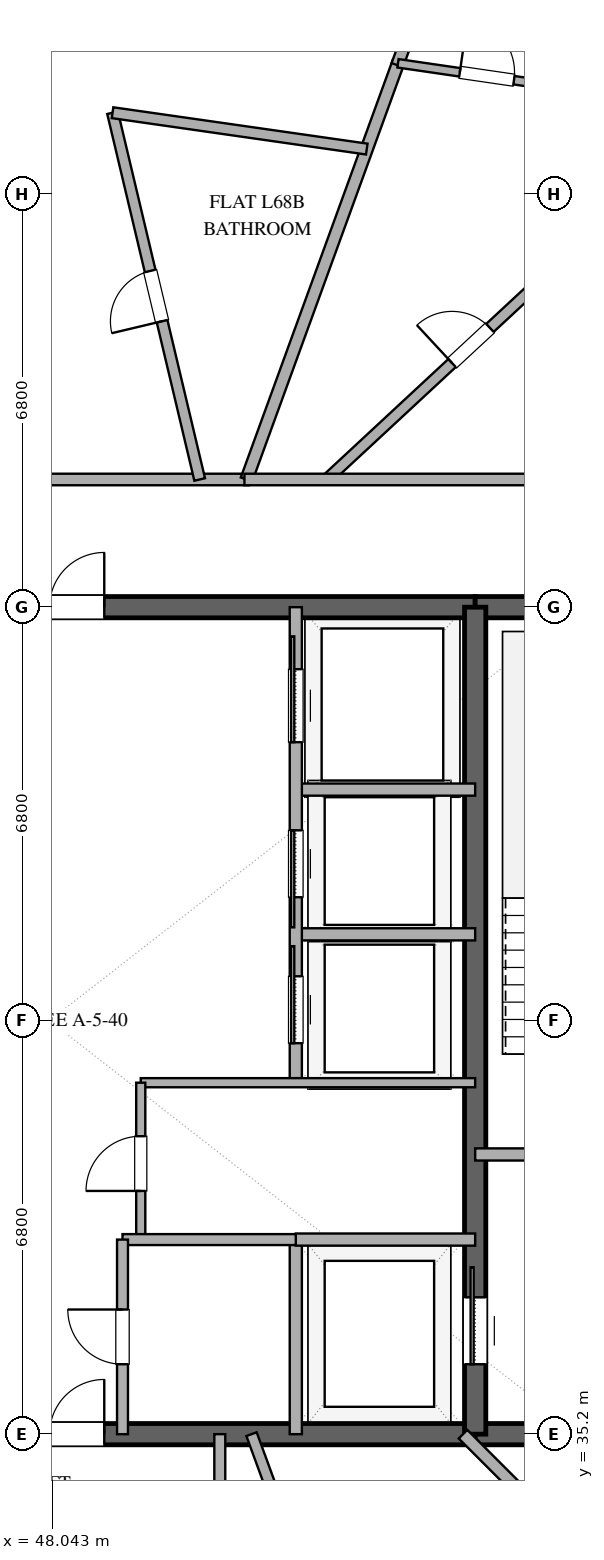
"""IFC4 building model, lengths in metres.
Left out: names, types, materials, properties, quantities, classifications, styles, units other than length and angle.
Written with IfcOpenShell. Run it as: python <this file> out.ifc"""

import sys

from ifc_helpers import new_model, si_unit, direction, frame, frame_2d, origin, place, context, subcontext, project, spatial, rectangle, extrude, element, fill, save


model = new_model("IFC4")
c1 = context("Model", 3, precision=1e-05, world=origin(), true_north=direction((0.0, 1.0)))
c2 = subcontext(c1, "Body", "Model", "MODEL_VIEW")
j1 = project(units=[si_unit("LENGTHUNIT", "METRE"), si_unit("PLANEANGLEUNIT", "RADIAN")], contexts=[c1])
p1 = place(None, origin())
s1 = spatial("IfcSite", under=j1, at=p1, CompositionType="ELEMENT")
p2 = place(p1, origin())
s2 = spatial("IfcBuilding", under=s1, at=p2, CompositionType="ELEMENT")
p3 = place(p2, frame((0.0, 0.0, 265.8)))
s3 = spatial("IfcBuildingStorey", under=s2, at=p3, CompositionType="ELEMENT", Elevation=265.8)
p4 = place(p3, frame((41.0, 35.2, 0.0), z_axis=(0.0, 0.0, 1.0), x_axis=(1.0, 0.0, 0.0)))
e1 = element("IfcWall", 1, at=p4, inside=s3, PredefinedType="SHEAR", context=c2, shape_type="SweptSolid", body=[
    extrude(rectangle(XDim=14.0, YDim=0.35, at=frame_2d((7.0, 0.0))), origin(), (0.0, 0.0, 1.0), 3.37),
])
p5 = place(p4, frame((6.1, 0.0, 0.0)))
e2 = element("IfcOpeningElement", 2, at=p5, cuts=e1, PredefinedType="OPENING", context=c2, shape_type="SweptSolid", body=[
    extrude(rectangle(XDim=1.8, YDim=2.25, at=frame_2d((0.9, 1.125))), frame((0.0, 0.185, 0.0), z_axis=(0.0, -1.0, 0.0), x_axis=(1.0, 0.0, 0.0)), (0.0, 0.0, 1.0), 0.37),
])
p6 = place(p3, frame((55.0, 35.2, 0.0), z_axis=(0.0, 0.0, 1.0), x_axis=(1.0, 0.0, 0.0)))
e3 = element("IfcWall", 3, at=p6, inside=s3, PredefinedType="SHEAR", context=c2, shape_type="SweptSolid", body=[
    extrude(rectangle(XDim=4.0, YDim=0.35, at=frame_2d((2.0, 0.0))), origin(), (0.0, 0.0, 1.0), 3.37),
])
p7 = place(p3, frame((41.0, 48.8, 0.0), z_axis=(0.0, 0.0, 1.0), x_axis=(1.0, 0.0, 0.0)))
e4 = element("IfcWall", 4, at=p7, inside=s3, PredefinedType="SHEAR", context=c2, shape_type="SweptSolid", body=[
    extrude(rectangle(XDim=14.0, YDim=0.35, at=frame_2d((7.0, 0.0))), origin(), (0.0, 0.0, 1.0), 3.37),
])
p8 = place(p7, frame((6.1, 0.0, 0.0)))
e5 = element("IfcOpeningElement", 5, at=p8, cuts=e4, PredefinedType="OPENING", context=c2, shape_type="SweptSolid", body=[
    extrude(rectangle(XDim=1.8, YDim=2.25, at=frame_2d((0.9, 1.125))), frame((0.0, 0.185, 0.0), z_axis=(0.0, -1.0, 0.0), x_axis=(1.0, 0.0, 0.0)), (0.0, 0.0, 1.0), 0.37),
])
p9 = place(p3, frame((55.0, 48.8, 0.0), z_axis=(0.0, 0.0, 1.0), x_axis=(1.0, 0.0, 0.0)))
e6 = element("IfcWall", 6, at=p9, inside=s3, PredefinedType="SHEAR", context=c2, shape_type="SweptSolid", body=[
    extrude(rectangle(XDim=4.0, YDim=0.35, at=frame_2d((2.0, 0.0))), origin(), (0.0, 0.0, 1.0), 3.37),
])
p10 = place(p3, frame((55.0, 35.2, 0.0), z_axis=(0.0, 0.0, 1.0), x_axis=(0.0, 1.0, 0.0)))
e7 = element("IfcWall", 7, at=p10, inside=s3, PredefinedType="SHEAR", context=c2, shape_type="SweptSolid", body=[
    extrude(rectangle(XDim=13.6, YDim=0.35, at=frame_2d((6.8, 0.0))), origin(), (0.0, 0.0, 1.0), 3.37),
])
p11 = place(p10, frame((1.15, 0.0, 0.0)))
e8 = element("IfcOpeningElement", 8, at=p11, cuts=e7, PredefinedType="OPENING", context=c2, shape_type="SweptSolid", body=[
    extrude(rectangle(XDim=1.1, YDim=2.2, at=frame_2d((0.55, 1.1))), frame((0.0, 0.185, 0.0), z_axis=(0.0, -1.0, 0.0), x_axis=(1.0, 0.0, 0.0)), (0.0, 0.0, 1.0), 0.37),
])
p12 = place(p3, frame((55.0, 39.8, 0.0), z_axis=(0.0, 0.0, 1.0), x_axis=(1.0, 0.0, 0.0)))
e9 = element("IfcWall", 9, at=p12, inside=s3, PredefinedType="SOLIDWALL", context=c2, shape_type="SweptSolid", body=[
    extrude(rectangle(XDim=4.0, YDim=0.2, at=frame_2d((2.0, 0.0))), origin(), (0.0, 0.0, 1.0), 2.73),
])
p13 = place(p12, frame((1.45, 0.0, 0.0)))
e10 = element("IfcOpeningElement", 10, at=p13, cuts=e9, PredefinedType="OPENING", context=c2, shape_type="SweptSolid", body=[
    extrude(rectangle(XDim=1.1, YDim=2.15, at=frame_2d((0.55, 1.075))), frame((0.0, 0.11, 0.0), z_axis=(0.0, -1.0, 0.0), x_axis=(1.0, 0.0, 0.0)), (0.0, 0.0, 1.0), 0.22),
])
p14 = place(p3, frame((52.05, 35.2, 0.0), z_axis=(0.0, 0.0, 1.0), x_axis=(0.0, 1.0, 0.0)))
e11 = element("IfcWall", 11, at=p14, inside=s3, PredefinedType="SOLIDWALL", context=c2, shape_type="SweptSolid", body=[
    extrude(rectangle(XDim=3.2, YDim=0.2, at=frame_2d((1.6, 0.0))), origin(), (0.0, 0.0, 1.0), 2.73),
])
for number, where, z_axis, x_axis in (
    (12, (52.05, 38.4, 0.0), (0.0, 0.0, 1.0), (1.0, 0.0, 0.0)),
    (13, (52.05, 43.42, 0.0), (0.0, 0.0, 1.0), (1.0, 0.0, 0.0)),
    (14, (52.05, 45.8, 0.0), (0.0, 0.0, 1.0), (1.0, 0.0, 0.0)),
):
    element("IfcWall", number, at=place(p3, frame(where, z_axis=z_axis, x_axis=x_axis)), inside=s3, PredefinedType="SOLIDWALL", context=c2, shape_type="SweptSolid", body=[
        extrude(rectangle(XDim=2.95, YDim=0.2, at=frame_2d((1.475, 0.0))), origin(), (0.0, 0.0, 1.0), 2.73),
    ])
p15 = place(p3, frame((52.05, 40.98, 0.0), z_axis=(0.0, 0.0, 1.0), x_axis=(0.0, 1.0, 0.0)))
e15 = element("IfcWall", 15, at=p15, inside=s3, PredefinedType="SOLIDWALL", context=c2, shape_type="SweptSolid", body=[
    extrude(rectangle(XDim=7.82, YDim=0.2, at=frame_2d((3.91, 0.0))), origin(), (0.0, 0.0, 1.0), 2.73),
])
p16 = place(p15, frame((0.65, 0.0, 0.0)))
e16 = element("IfcOpeningElement", 16, at=p16, cuts=e15, PredefinedType="OPENING", context=c2, shape_type="SweptSolid", body=[
    extrude(rectangle(XDim=1.1, YDim=2.2, at=frame_2d((0.55, 1.1))), frame((0.0, 0.11, 0.0), z_axis=(0.0, -1.0, 0.0), x_axis=(1.0, 0.0, 0.0)), (0.0, 0.0, 1.0), 0.22),
])
p17 = place(p15, frame((3.05, 0.0, 0.0)))
e17 = element("IfcOpeningElement", 17, at=p17, cuts=e15, PredefinedType="OPENING", context=c2, shape_type="SweptSolid", body=[
    extrude(rectangle(XDim=1.1, YDim=2.2, at=frame_2d((0.55, 1.1))), frame((0.0, 0.11, 0.0), z_axis=(0.0, -1.0, 0.0), x_axis=(1.0, 0.0, 0.0)), (0.0, 0.0, 1.0), 0.22),
])
p18 = place(p15, frame((5.6, 0.0, 0.0)))
e18 = element("IfcOpeningElement", 18, at=p18, cuts=e15, PredefinedType="OPENING", context=c2, shape_type="SweptSolid", body=[
    extrude(rectangle(XDim=1.2, YDim=2.2, at=frame_2d((0.6, 1.1))), frame((0.0, 0.11, 0.0), z_axis=(0.0, -1.0, 0.0), x_axis=(1.0, 0.0, 0.0)), (0.0, 0.0, 1.0), 0.22),
])
p19 = place(p3, frame((49.5, 40.98, 0.0), z_axis=(0.0, 0.0, 1.0), x_axis=(1.0, 0.0, 0.0)))
e19 = element("IfcWall", 19, at=p19, inside=s3, PredefinedType="PARTITIONING", context=c2, shape_type="SweptSolid", body=[
    extrude(rectangle(XDim=5.5, YDim=0.15, at=frame_2d((2.75, 0.0))), origin(), (0.0, 0.0, 1.0), 2.73),
])
p20 = place(p3, frame((49.5, 38.4, 0.0), z_axis=(0.0, 0.0, 1.0), x_axis=(0.0, 1.0, 0.0)))
e20 = element("IfcWall", 20, at=p20, inside=s3, PredefinedType="PARTITIONING", context=c2, shape_type="SweptSolid", body=[
    extrude(rectangle(XDim=2.58, YDim=0.15, at=frame_2d((1.29, 0.0))), origin(), (0.0, 0.0, 1.0), 2.73),
])
p21 = place(p20, frame((0.8, 0.0, 0.0)))
e21 = element("IfcOpeningElement", 21, at=p21, cuts=e20, PredefinedType="OPENING", context=c2, shape_type="SweptSolid", body=[
    extrude(rectangle(XDim=0.9, YDim=2.15, at=frame_2d((0.45, 1.075))), frame((0.0, 0.085, 0.0), z_axis=(0.0, -1.0, 0.0), x_axis=(1.0, 0.0, 0.0)), (0.0, 0.0, 1.0), 0.17),
])
p22 = place(p3, frame((49.2, 38.4, 0.0), z_axis=(0.0, 0.0, 1.0), x_axis=(1.0, 0.0, 0.0)))
e22 = element("IfcWall", 22, at=p22, inside=s3, PredefinedType="PLUMBINGWALL", context=c2, shape_type="SweptSolid", body=[
    extrude(rectangle(XDim=2.85, YDim=0.18, at=frame_2d((1.425, 0.0))), origin(), (0.0, 0.0, 1.0), 2.73),
])
p23 = place(p3, frame((49.2, 35.2, 0.0), z_axis=(0.0, 0.0, 1.0), x_axis=(0.0, 1.0, 0.0)))
e23 = element("IfcWall", 23, at=p23, inside=s3, PredefinedType="PLUMBINGWALL", context=c2, shape_type="SweptSolid", body=[
    extrude(rectangle(XDim=3.2, YDim=0.18, at=frame_2d((1.6, 0.0))), origin(), (0.0, 0.0, 1.0), 2.73),
])
p24 = place(p23, frame((1.15, 0.0, 0.0)))
e24 = element("IfcOpeningElement", 24, at=p24, cuts=e23, PredefinedType="OPENING", context=c2, shape_type="SweptSolid", body=[
    extrude(rectangle(XDim=0.9, YDim=2.1, at=frame_2d((0.45, 1.05))), frame((0.0, 0.1, 0.0), z_axis=(0.0, -1.0, 0.0), x_axis=(1.0, 0.0, 0.0)), (0.0, 0.0, 1.0), 0.2),
])
p25 = place(p3, frame((34.8, 50.9, 0.0), z_axis=(0.0, 0.0, 1.0), x_axis=(1.0, 0.0, 0.0)))
e25 = element("IfcWall", 25, at=p25, inside=s3, PredefinedType="PARTITIONING", context=c2, shape_type="SweptSolid", body=[
    extrude(rectangle(XDim=16.473, YDim=0.19, at=frame_2d((8.237, 0.0))), origin(), (0.0, 0.0, 1.0), 2.73),
])
p26 = place(p25, frame((10.196, 0.0, 0.0)))
e26 = element("IfcOpeningElement", 26, at=p26, cuts=e25, PredefinedType="OPENING", context=c2, shape_type="SweptSolid", body=[
    extrude(rectangle(XDim=1.0, YDim=2.2, at=frame_2d((0.5, 1.1))), frame((0.0, 0.105, 0.0), z_axis=(0.0, -1.0, 0.0), x_axis=(1.0, 0.0, 0.0)), (0.0, 0.0, 1.0), 0.21),
])
p27 = place(p25, frame((2.387, 0.0, 0.0)))
e27 = element("IfcOpeningElement", 27, at=p27, cuts=e25, PredefinedType="OPENING", context=c2, shape_type="SweptSolid", body=[
    extrude(rectangle(XDim=1.0, YDim=2.2, at=frame_2d((0.5, 1.1))), frame((0.0, 0.105, 0.0), z_axis=(0.0, -1.0, 0.0), x_axis=(1.0, 0.0, 0.0)), (0.0, 0.0, 1.0), 0.21),
])
p28 = place(p3, frame((63.561, 26.439, 0.0), z_axis=(0.0, 0.0, 1.0), x_axis=(-0.707106781187, 0.707106781187, 0.0)))
e28 = element("IfcWall", 28, at=p28, inside=s3, PredefinedType="PARTITIONING", context=c2, shape_type="SweptSolid", body=[
    extrude(rectangle(XDim=12.389, YDim=0.2, at=frame_2d((6.195, 0.0))), origin(), (0.0, 0.0, 1.0), 2.73),
])
p29 = place(p3, frame((51.322, 35.2, 0.0), z_axis=(0.0, 0.0, 1.0), x_axis=(0.343730484072, -0.939068343796, 0.0)))
e29 = element("IfcWall", 29, at=p29, inside=s3, PredefinedType="PLUMBINGWALL", context=c2, shape_type="SweptSolid", body=[
    extrude(rectangle(XDim=7.897, YDim=0.18, at=frame_2d((3.949, 0.0))), origin(), (0.0, 0.0, 1.0), 2.73),
])
p30 = place(p29, frame((3.524, 0.0, 0.0)))
e30 = element("IfcOpeningElement", 30, at=p30, cuts=e29, PredefinedType="OPENING", context=c2, shape_type="SweptSolid", body=[
    extrude(rectangle(XDim=0.85, YDim=2.1, at=frame_2d((0.425, 1.05))), frame((0.0, 0.1, 0.0), z_axis=(0.0, -1.0, 0.0), x_axis=(1.0, 0.0, 0.0)), (0.0, 0.0, 1.0), 0.2),
])
p31 = place(p3, frame((52.558, 50.9, 0.0), z_axis=(0.0, 0.0, 1.0), x_axis=(0.732849863846, 0.68039038578, 0.0)))
e31 = element("IfcWall", 31, at=p31, inside=s3, PredefinedType="PLUMBINGWALL", context=c2, shape_type="SweptSolid", body=[
    extrude(rectangle(XDim=6.478, YDim=0.18, at=frame_2d((3.239, 0.0))), origin(), (0.0, 0.0, 1.0), 2.73),
])
p32 = place(p31, frame((2.814, 0.0, 0.0)))
e32 = element("IfcOpeningElement", 32, at=p32, cuts=e31, PredefinedType="OPENING", context=c2, shape_type="SweptSolid", body=[
    extrude(rectangle(XDim=0.85, YDim=2.1, at=frame_2d((0.425, 1.05))), frame((0.0, 0.1, 0.0), z_axis=(0.0, -1.0, 0.0), x_axis=(1.0, 0.0, 0.0)), (0.0, 0.0, 1.0), 0.2),
])
p33 = place(p3, frame((50.469, 50.9, 0.0), z_axis=(0.0, 0.0, 1.0), x_axis=(-0.231121823084, 0.972924818727, 0.0)))
e33 = element("IfcWall", 33, at=p33, inside=s3, PredefinedType="PLUMBINGWALL", context=c2, shape_type="SweptSolid", body=[
    extrude(rectangle(XDim=6.2, YDim=0.18, at=frame_2d((3.1, 0.0))), origin(), (0.0, 0.0, 1.0), 2.73),
])
p34 = place(p33, frame((2.675, 0.0, 0.0)))
e34 = element("IfcOpeningElement", 34, at=p34, cuts=e33, PredefinedType="OPENING", context=c2, shape_type="SweptSolid", body=[
    extrude(rectangle(XDim=0.85, YDim=2.1, at=frame_2d((0.425, 1.05))), frame((0.0, 0.1, 0.0), z_axis=(0.0, -1.0, 0.0), x_axis=(1.0, 0.0, 0.0)), (0.0, 0.0, 1.0), 0.2),
])
p35 = place(p3, frame((51.239, 50.9, 0.0), z_axis=(0.0, 0.0, 1.0), x_axis=(0.342027045015, 0.939690108748, 0.0)))
e35 = element("IfcWall", 35, at=p35, inside=s3, PredefinedType="PARTITIONING", context=c2, shape_type="SweptSolid", body=[
    extrude(rectangle(XDim=7.316, YDim=0.2, at=frame_2d((3.658, 0.0))), origin(), (0.0, 0.0, 1.0), 2.73),
])
p36 = place(p3, frame((51.205, 50.9, 0.0), z_axis=(0.0, 0.0, 1.0), x_axis=(1.0, 0.0, 0.0)))
e36 = element("IfcWall", 36, at=p36, inside=s3, PredefinedType="PARTITIONING", context=c2, shape_type="SweptSolid", body=[
    extrude(rectangle(XDim=9.995, YDim=0.19, at=frame_2d((4.998, 0.0))), origin(), (0.0, 0.0, 1.0), 2.73),
])
p37 = place(p3, frame((49.036, 56.932, 0.0), z_axis=(0.0, 0.0, 1.0), x_axis=(0.989927514161, -0.141575127434, 0.0)))
e37 = element("IfcWall", 37, at=p37, inside=s3, PredefinedType="PLUMBINGWALL", context=c2, shape_type="SweptSolid", body=[
    extrude(rectangle(XDim=4.223, YDim=0.18, at=frame_2d((2.112, 0.0))), origin(), (0.0, 0.0, 1.0), 2.73),
])
p38 = place(p3, frame((54.867, 60.866, 0.0), z_axis=(0.0, 0.0, 1.0), x_axis=(-0.342000121366, -0.939699907942, 0.0)))
e38 = element("IfcWall", 38, at=p38, inside=s3, PredefinedType="PARTITIONING", context=c2, shape_type="SweptSolid", body=[
    extrude(rectangle(XDim=3.355, YDim=0.2, at=frame_2d((1.678, 0.0))), origin(), (0.0, 0.0, 1.0), 2.73),
])
p39 = place(p3, frame((53.73, 57.744, 0.0), z_axis=(0.0, 0.0, 1.0), x_axis=(0.989530523264, -0.144323745545, 0.0)))
e39 = element("IfcWall", 39, at=p39, inside=s3, PredefinedType="PARTITIONING", context=c2, shape_type="SweptSolid", body=[
    extrude(rectangle(XDim=2.955, YDim=0.14, at=frame_2d((1.478, 0.0))), origin(), (0.0, 0.0, 1.0), 2.73),
])
p40 = place(p39, frame((1.028, 0.0, 0.0)))
e40 = element("IfcOpeningElement", 40, at=p40, cuts=e39, PredefinedType="OPENING", context=c2, shape_type="SweptSolid", body=[
    extrude(rectangle(XDim=0.9, YDim=2.1, at=frame_2d((0.45, 1.05))), frame((0.0, 0.08, 0.0), z_axis=(0.0, -1.0, 0.0), x_axis=(1.0, 0.0, 0.0)), (0.0, 0.0, 1.0), 0.16),
])
p41 = place(p3, frame((50.8, 35.2, 0.0), z_axis=(0.0, 0.0, 1.0), x_axis=(0.0, -1.0, 0.0)))
e41 = element("IfcWall", 41, at=p41, inside=s3, PredefinedType="PLUMBINGWALL", context=c2, shape_type="SweptSolid", body=[
    extrude(rectangle(XDim=2.1, YDim=0.18, at=frame_2d((1.05, 0.0))), origin(), (0.0, 0.0, 1.0), 2.73),
])
p42 = place(p11, origin())
e42 = element("IfcDoor", 42, at=p42, inside=s3, OperationType="SLIDING_TO_RIGHT", PredefinedType="DOOR", context=c2, shape_type="SweptSolid", body=[
    extrude(rectangle(XDim=1.1, YDim=2.2, at=frame_2d((0.55, 1.1))), frame((0.0, 0.025, 0.0), z_axis=(0.0, -1.0, 0.0), x_axis=(1.0, 0.0, 0.0)), (0.0, 0.0, 1.0), 0.05),
])
fill(e8, e42)
p43 = place(p5, origin())
e43 = element("IfcDoor", 43, at=p43, inside=s3, OperationType="DOUBLE_DOOR_SINGLE_SWING", PredefinedType="DOOR", context=c2, shape_type="SweptSolid", body=[
    extrude(rectangle(XDim=1.8, YDim=2.25, at=frame_2d((0.9, 1.125))), frame((0.0, 0.025, 0.0), z_axis=(0.0, -1.0, 0.0), x_axis=(1.0, 0.0, 0.0)), (0.0, 0.0, 1.0), 0.05),
])
fill(e2, e43)
p44 = place(p8, origin())
e44 = element("IfcDoor", 44, at=p44, inside=s3, OperationType="DOUBLE_DOOR_SINGLE_SWING", PredefinedType="DOOR", context=c2, shape_type="SweptSolid", body=[
    extrude(rectangle(XDim=1.8, YDim=2.25, at=frame_2d((0.9, 1.125))), frame((0.0, 0.025, 0.0), z_axis=(0.0, -1.0, 0.0), x_axis=(1.0, 0.0, 0.0)), (0.0, 0.0, 1.0), 0.05),
])
fill(e5, e44)
p45 = place(p16, origin())
e45 = element("IfcDoor", 45, at=p45, inside=s3, OperationType="SLIDING_TO_RIGHT", PredefinedType="DOOR", context=c2, shape_type="SweptSolid", body=[
    extrude(rectangle(XDim=1.1, YDim=2.2, at=frame_2d((0.55, 1.1))), frame((0.0, 0.025, 0.0), z_axis=(0.0, -1.0, 0.0), x_axis=(1.0, 0.0, 0.0)), (0.0, 0.0, 1.0), 0.05),
])
fill(e16, e45)
p46 = place(p17, origin())
e46 = element("IfcDoor", 46, at=p46, inside=s3, OperationType="SLIDING_TO_LEFT", PredefinedType="DOOR", context=c2, shape_type="SweptSolid", body=[
    extrude(rectangle(XDim=1.1, YDim=2.2, at=frame_2d((0.55, 1.1))), frame((0.0, 0.025, 0.0), z_axis=(0.0, -1.0, 0.0), x_axis=(1.0, 0.0, 0.0)), (0.0, 0.0, 1.0), 0.05),
])
fill(e17, e46)
p47 = place(p18, origin())
e47 = element("IfcDoor", 47, at=p47, inside=s3, OperationType="SLIDING_TO_RIGHT", PredefinedType="DOOR", context=c2, shape_type="SweptSolid", body=[
    extrude(rectangle(XDim=1.2, YDim=2.2, at=frame_2d((0.6, 1.1))), frame((0.0, 0.025, 0.0), z_axis=(0.0, -1.0, 0.0), x_axis=(1.0, 0.0, 0.0)), (0.0, 0.0, 1.0), 0.05),
])
fill(e18, e47)
p48 = place(p21, origin())
e48 = element("IfcDoor", 48, at=p48, inside=s3, OperationType="SINGLE_SWING_LEFT", PredefinedType="DOOR", context=c2, shape_type="SweptSolid", body=[
    extrude(rectangle(XDim=0.9, YDim=2.15, at=frame_2d((0.45, 1.075))), frame((0.0, 0.025, 0.0), z_axis=(0.0, -1.0, 0.0), x_axis=(1.0, 0.0, 0.0)), (0.0, 0.0, 1.0), 0.05),
])
fill(e21, e48)
p49 = place(p24, origin())
e49 = element("IfcDoor", 49, at=p49, inside=s3, OperationType="SINGLE_SWING_RIGHT", PredefinedType="DOOR", context=c2, shape_type="SweptSolid", body=[
    extrude(rectangle(XDim=0.9, YDim=2.1, at=frame_2d((0.45, 1.05))), frame((0.0, 0.025, 0.0), z_axis=(0.0, -1.0, 0.0), x_axis=(1.0, 0.0, 0.0)), (0.0, 0.0, 1.0), 0.05),
])
fill(e24, e49)
p50 = place(p32, origin())
e50 = element("IfcDoor", 50, at=p50, inside=s3, OperationType="SINGLE_SWING_LEFT", PredefinedType="DOOR", context=c2, shape_type="SweptSolid", body=[
    extrude(rectangle(XDim=0.85, YDim=2.1, at=frame_2d((0.425, 1.05))), frame((0.0, 0.025, 0.0), z_axis=(0.0, -1.0, 0.0), x_axis=(1.0, 0.0, 0.0)), (0.0, 0.0, 1.0), 0.05),
])
fill(e32, e50)
p51 = place(p34, origin())
e51 = element("IfcDoor", 51, at=p51, inside=s3, OperationType="SINGLE_SWING_LEFT", PredefinedType="DOOR", context=c2, shape_type="SweptSolid", body=[
    extrude(rectangle(XDim=0.85, YDim=2.1, at=frame_2d((0.425, 1.05))), frame((0.0, 0.025, 0.0), z_axis=(0.0, -1.0, 0.0), x_axis=(1.0, 0.0, 0.0)), (0.0, 0.0, 1.0), 0.05),
])
fill(e34, e51)
p52 = place(p40, origin())
e52 = element("IfcDoor", 52, at=p52, inside=s3, OperationType="SINGLE_SWING_LEFT", PredefinedType="DOOR", context=c2, shape_type="SweptSolid", body=[
    extrude(rectangle(XDim=0.9, YDim=2.1, at=frame_2d((0.45, 1.05))), frame((0.0, 0.025, 0.0), z_axis=(0.0, -1.0, 0.0), x_axis=(1.0, 0.0, 0.0)), (0.0, 0.0, 1.0), 0.05),
])
fill(e40, e52)
save(model, sys.argv[1])
